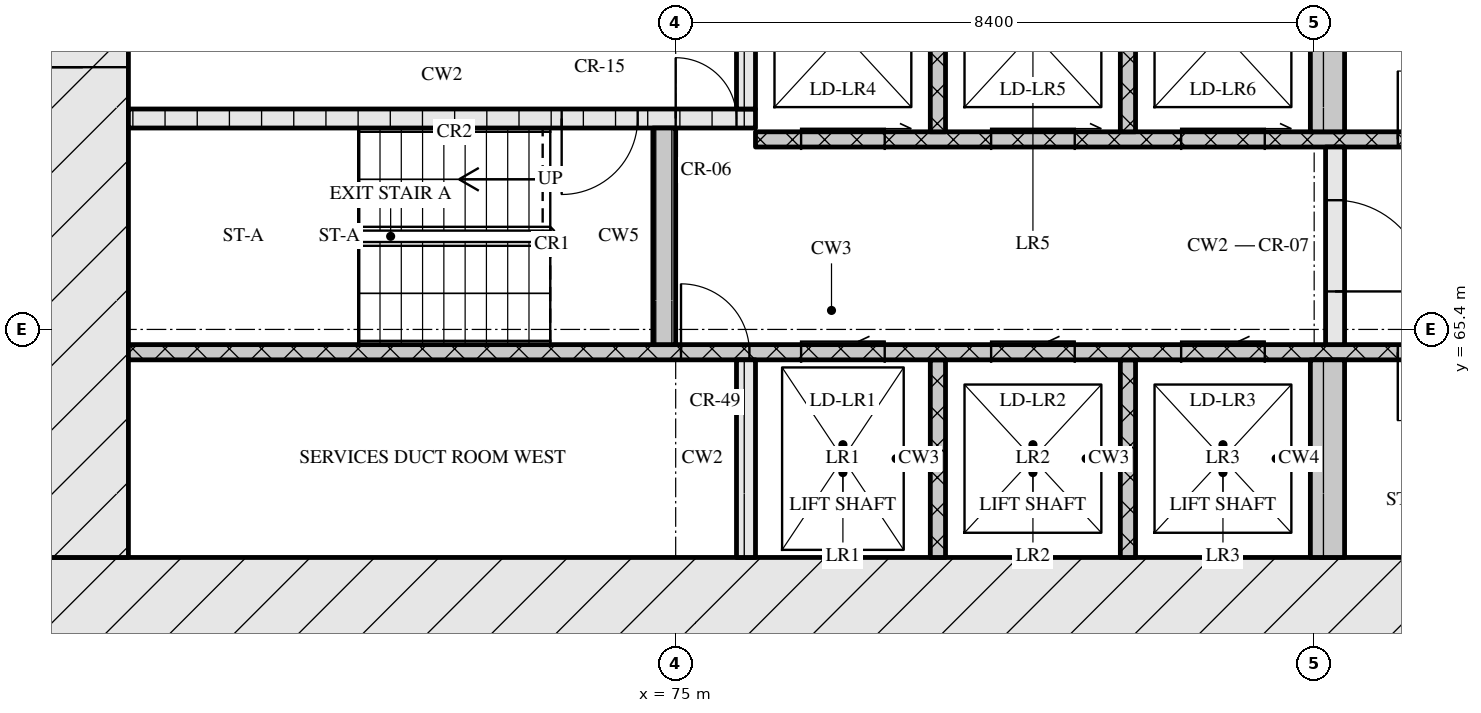
"""IFC4 building model, lengths in metres.
Left out: names, types, materials, properties, quantities, classifications, styles, units other than length and angle.
Written with IfcOpenShell. Run it as: python <this file> out.ifc"""

import sys

from ifc_helpers import new_model, si_unit, direction, frame, frame_2d, origin, place, context, subcontext, project, spatial, rectangle, extrude, element, fill, save


model = new_model("IFC4")
c1 = context("Model", 3, precision=1e-05, world=origin(), true_north=direction((0.0, 1.0)))
c2 = subcontext(c1, "Body", "Model", "MODEL_VIEW")
j1 = project(units=[si_unit("LENGTHUNIT", "METRE"), si_unit("PLANEANGLEUNIT", "RADIAN")], contexts=[c1])
p1 = place(None, origin())
s1 = spatial("IfcSite", under=j1, at=p1, CompositionType="ELEMENT")
p2 = place(p1, origin())
s2 = spatial("IfcBuilding", under=s1, at=p2, CompositionType="ELEMENT")
p3 = place(p2, frame((0.0, 0.0, 66.0)))
s3 = spatial("IfcBuildingStorey", under=s2, at=p3, CompositionType="ELEMENT", Elevation=66.0)
p4 = place(p3, frame((66.6, 61.8, 0.0), z_axis=(0.0, 0.0, 1.0), x_axis=(1.0, 0.0, 0.0)))
e1 = element("IfcWall", 1, at=p4, inside=s3, PredefinedType="SOLIDWALL", context=c2, shape_type="SweptSolid", body=[
    extrude(rectangle(XDim=42.0, YDim=1.2, at=frame_2d((21.0, 0.0))), origin(), (0.0, 0.0, 1.0), 3.32),
])
p5 = place(p4, frame((21.35, 0.0, 0.0)))
e2 = element("IfcOpeningElement", 2, at=p5, cuts=e1, PredefinedType="OPENING", context=c2, shape_type="SweptSolid", body=[
    extrude(rectangle(XDim=1.8, YDim=2.1, at=frame_2d((0.9, 1.05))), frame((0.0, 0.61, 0.0), z_axis=(0.0, -1.0, 0.0), x_axis=(1.0, 0.0, 0.0)), (0.0, 0.0, 1.0), 1.22),
])
p6 = place(p3, frame((67.2, 62.4, 0.0), z_axis=(0.0, 0.0, 1.0), x_axis=(0.0, 1.0, 0.0)))
e3 = element("IfcWall", 3, at=p6, inside=s3, PredefinedType="SOLIDWALL", context=c2, shape_type="SweptSolid", body=[
    extrude(rectangle(XDim=12.0, YDim=1.2, at=frame_2d((6.0, 0.0))), origin(), (0.0, 0.0, 1.0), 3.32),
])
p7 = place(p6, frame((6.45, 0.0, 0.0)))
e4 = element("IfcOpeningElement", 4, at=p7, cuts=e3, PredefinedType="OPENING", context=c2, shape_type="SweptSolid", body=[
    extrude(rectangle(XDim=1.2, YDim=2.1, at=frame_2d((0.6, 1.05))), frame((0.0, 0.61, 0.0), z_axis=(0.0, -1.0, 0.0), x_axis=(1.0, 0.0, 0.0)), (0.0, 0.0, 1.0), 1.22),
])
p8 = place(p3, frame((75.925, 62.4, 0.0), z_axis=(0.0, 0.0, 1.0), x_axis=(0.0, 1.0, 0.0)))
e5 = element("IfcWall", 5, at=p8, inside=s3, PredefinedType="SOLIDWALL", context=c2, shape_type="SweptSolid", body=[
    extrude(rectangle(XDim=2.6, YDim=0.25, at=frame_2d((1.3, 0.0))), origin(), (0.0, 0.0, 1.0), 3.32),
])
for number, where, z_axis, x_axis in (
    (6, (78.45, 62.4, 0.0), (0.0, 0.0, 1.0), (0.0, 1.0, 0.0)),
    (7, (80.95, 62.4, 0.0), (0.0, 0.0, 1.0), (0.0, 1.0, 0.0)),
):
    element("IfcWall", number, at=place(p3, frame(where, z_axis=z_axis, x_axis=x_axis)), inside=s3, PredefinedType="SOLIDWALL", context=c2, shape_type="SweptSolid", body=[
        extrude(rectangle(XDim=2.6, YDim=0.2, at=frame_2d((1.3, 0.0))), origin(), (0.0, 0.0, 1.0), 3.32),
    ])
p9 = place(p3, frame((83.575, 62.4, 0.0), z_axis=(0.0, 0.0, 1.0), x_axis=(0.0, 1.0, 0.0)))
e8 = element("IfcWall", 8, at=p9, inside=s3, PredefinedType="SOLIDWALL", context=c2, shape_type="SweptSolid", body=[
    extrude(rectangle(XDim=2.6, YDim=0.45, at=frame_2d((1.3, 0.0))), origin(), (0.0, 0.0, 1.0), 3.32),
])
p10 = place(p3, frame((67.8, 65.1, 0.0), z_axis=(0.0, 0.0, 1.0), x_axis=(1.0, 0.0, 0.0)))
e9 = element("IfcWall", 9, at=p10, inside=s3, PredefinedType="SOLIDWALL", context=c2, shape_type="SweptSolid", body=[
    extrude(rectangle(XDim=18.5, YDim=0.2, at=frame_2d((9.25, 0.0))), origin(), (0.0, 0.0, 1.0), 3.32),
])
p11 = place(p10, frame((7.27, 0.0, 0.0)))
e10 = element("IfcOpeningElement", 10, at=p11, cuts=e9, PredefinedType="OPENING", context=c2, shape_type="SweptSolid", body=[
    extrude(rectangle(XDim=0.9, YDim=2.1, at=frame_2d((0.45, 1.05))), frame((0.0, 0.11, 0.0), z_axis=(0.0, -1.0, 0.0), x_axis=(1.0, 0.0, 0.0)), (0.0, 0.0, 1.0), 0.22),
])
p12 = place(p10, frame((8.85, 0.0, 0.0)))
e11 = element("IfcOpeningElement", 11, at=p12, cuts=e9, PredefinedType="OPENING", context=c2, shape_type="SweptSolid", body=[
    extrude(rectangle(XDim=1.1, YDim=2.1, at=frame_2d((0.55, 1.05))), frame((0.0, 0.11, 0.0), z_axis=(0.0, -1.0, 0.0), x_axis=(1.0, 0.0, 0.0)), (0.0, 0.0, 1.0), 0.22),
])
p13 = place(p10, frame((11.35, 0.0, 0.0)))
e12 = element("IfcOpeningElement", 12, at=p13, cuts=e9, PredefinedType="OPENING", context=c2, shape_type="SweptSolid", body=[
    extrude(rectangle(XDim=1.1, YDim=2.1, at=frame_2d((0.55, 1.05))), frame((0.0, 0.11, 0.0), z_axis=(0.0, -1.0, 0.0), x_axis=(1.0, 0.0, 0.0)), (0.0, 0.0, 1.0), 0.22),
])
p14 = place(p10, frame((13.85, 0.0, 0.0)))
e13 = element("IfcOpeningElement", 13, at=p14, cuts=e9, PredefinedType="OPENING", context=c2, shape_type="SweptSolid", body=[
    extrude(rectangle(XDim=1.1, YDim=2.1, at=frame_2d((0.55, 1.05))), frame((0.0, 0.11, 0.0), z_axis=(0.0, -1.0, 0.0), x_axis=(1.0, 0.0, 0.0)), (0.0, 0.0, 1.0), 0.22),
])
p15 = place(p10, frame((16.7, 0.0, 0.0)))
e14 = element("IfcOpeningElement", 14, at=p15, cuts=e9, PredefinedType="OPENING", context=c2, shape_type="SweptSolid", body=[
    extrude(rectangle(XDim=0.9, YDim=2.1, at=frame_2d((0.45, 1.05))), frame((0.0, 0.11, 0.0), z_axis=(0.0, -1.0, 0.0), x_axis=(1.0, 0.0, 0.0)), (0.0, 0.0, 1.0), 0.22),
])
p16 = place(p3, frame((74.85, 65.2, 0.0), z_axis=(0.0, 0.0, 1.0), x_axis=(0.0, 1.0, 0.0)))
e15 = element("IfcWall", 15, at=p16, inside=s3, PredefinedType="SOLIDWALL", context=c2, shape_type="SweptSolid", body=[
    extrude(rectangle(XDim=2.85, YDim=0.3, at=frame_2d((1.425, 0.0))), origin(), (0.0, 0.0, 1.0), 3.32),
])
p17 = place(p3, frame((83.675, 65.2, 0.0), z_axis=(0.0, 0.0, 1.0), x_axis=(0.0, 1.0, 0.0)))
e16 = element("IfcWall", 16, at=p17, inside=s3, PredefinedType="SOLIDWALL", context=c2, shape_type="SweptSolid", body=[
    extrude(rectangle(XDim=2.6, YDim=0.25, at=frame_2d((1.3, 0.0))), origin(), (0.0, 0.0, 1.0), 3.32),
])
p18 = place(p17, frame((0.7, 0.0, 0.0)))
e17 = element("IfcOpeningElement", 17, at=p18, cuts=e16, PredefinedType="OPENING", context=c2, shape_type="SweptSolid", body=[
    extrude(rectangle(XDim=1.2, YDim=2.1, at=frame_2d((0.6, 1.05))), frame((0.0, 0.135, 0.0), z_axis=(0.0, -1.0, 0.0), x_axis=(1.0, 0.0, 0.0)), (0.0, 0.0, 1.0), 0.27),
])
p19 = place(p3, frame((76.05, 67.9, 0.0), z_axis=(0.0, 0.0, 1.0), x_axis=(1.0, 0.0, 0.0)))
e18 = element("IfcWall", 18, at=p19, inside=s3, PredefinedType="SOLIDWALL", context=c2, shape_type="SweptSolid", body=[
    extrude(rectangle(XDim=23.1, YDim=0.2, at=frame_2d((11.55, 0.0))), origin(), (0.0, 0.0, 1.0), 3.32),
])
p20 = place(p19, frame((0.6, 0.0, 0.0)))
e19 = element("IfcOpeningElement", 19, at=p20, cuts=e18, PredefinedType="OPENING", context=c2, shape_type="SweptSolid", body=[
    extrude(rectangle(XDim=1.1, YDim=2.1, at=frame_2d((0.55, 1.05))), frame((0.0, 0.11, 0.0), z_axis=(0.0, -1.0, 0.0), x_axis=(1.0, 0.0, 0.0)), (0.0, 0.0, 1.0), 0.22),
])
p21 = place(p19, frame((3.1, 0.0, 0.0)))
e20 = element("IfcOpeningElement", 20, at=p21, cuts=e18, PredefinedType="OPENING", context=c2, shape_type="SweptSolid", body=[
    extrude(rectangle(XDim=1.1, YDim=2.1, at=frame_2d((0.55, 1.05))), frame((0.0, 0.11, 0.0), z_axis=(0.0, -1.0, 0.0), x_axis=(1.0, 0.0, 0.0)), (0.0, 0.0, 1.0), 0.22),
])
p22 = place(p19, frame((5.6, 0.0, 0.0)))
e21 = element("IfcOpeningElement", 21, at=p22, cuts=e18, PredefinedType="OPENING", context=c2, shape_type="SweptSolid", body=[
    extrude(rectangle(XDim=1.1, YDim=2.1, at=frame_2d((0.55, 1.05))), frame((0.0, 0.11, 0.0), z_axis=(0.0, -1.0, 0.0), x_axis=(1.0, 0.0, 0.0)), (0.0, 0.0, 1.0), 0.22),
])
p23 = place(p19, frame((8.45, 0.0, 0.0)))
e22 = element("IfcOpeningElement", 22, at=p23, cuts=e18, PredefinedType="OPENING", context=c2, shape_type="SweptSolid", body=[
    extrude(rectangle(XDim=0.9, YDim=2.1, at=frame_2d((0.45, 1.05))), frame((0.0, 0.11, 0.0), z_axis=(0.0, -1.0, 0.0), x_axis=(1.0, 0.0, 0.0)), (0.0, 0.0, 1.0), 0.22),
])
p24 = place(p19, frame((10.91, 0.0, 0.0)))
e23 = element("IfcOpeningElement", 23, at=p24, cuts=e18, PredefinedType="OPENING", context=c2, shape_type="SweptSolid", body=[
    extrude(rectangle(XDim=0.9, YDim=2.1, at=frame_2d((0.45, 1.05))), frame((0.0, 0.11, 0.0), z_axis=(0.0, -1.0, 0.0), x_axis=(1.0, 0.0, 0.0)), (0.0, 0.0, 1.0), 0.22),
])
p25 = place(p19, frame((13.55, 0.0, 0.0)))
e24 = element("IfcOpeningElement", 24, at=p25, cuts=e18, PredefinedType="OPENING", context=c2, shape_type="SweptSolid", body=[
    extrude(rectangle(XDim=1.0, YDim=2.1, at=frame_2d((0.5, 1.05))), frame((0.0, 0.11, 0.0), z_axis=(0.0, -1.0, 0.0), x_axis=(1.0, 0.0, 0.0)), (0.0, 0.0, 1.0), 0.22),
])
for number, where, z_axis, x_axis in (
    (25, (78.45, 68.0, 0.0), (0.0, 0.0, 1.0), (0.0, 1.0, 0.0)),
    (26, (80.95, 68.0, 0.0), (0.0, 0.0, 1.0), (0.0, 1.0, 0.0)),
):
    element("IfcWall", number, at=place(p3, frame(where, z_axis=z_axis, x_axis=x_axis)), inside=s3, PredefinedType="SOLIDWALL", context=c2, shape_type="SweptSolid", body=[
        extrude(rectangle(XDim=2.6, YDim=0.2, at=frame_2d((1.3, 0.0))), origin(), (0.0, 0.0, 1.0), 3.32),
    ])
p26 = place(p3, frame((83.575, 68.0, 0.0), z_axis=(0.0, 0.0, 1.0), x_axis=(0.0, 1.0, 0.0)))
e27 = element("IfcWall", 27, at=p26, inside=s3, PredefinedType="SOLIDWALL", context=c2, shape_type="SweptSolid", body=[
    extrude(rectangle(XDim=2.6, YDim=0.45, at=frame_2d((1.3, 0.0))), origin(), (0.0, 0.0, 1.0), 3.32),
])
p27 = place(p3, frame((67.8, 68.175, 0.0), z_axis=(0.0, 0.0, 1.0), x_axis=(1.0, 0.0, 0.0)))
e28 = element("IfcWall", 28, at=p27, inside=s3, PredefinedType="SOLIDWALL", context=c2, shape_type="SweptSolid", body=[
    extrude(rectangle(XDim=8.25, YDim=0.25, at=frame_2d((4.125, 0.0))), origin(), (0.0, 0.0, 1.0), 3.32),
])
p28 = place(p27, frame((5.7, 0.0, 0.0)))
e29 = element("IfcOpeningElement", 29, at=p28, cuts=e28, PredefinedType="OPENING", context=c2, shape_type="SweptSolid", body=[
    extrude(rectangle(XDim=1.0, YDim=2.1, at=frame_2d((0.5, 1.05))), frame((0.0, 0.135, 0.0), z_axis=(0.0, -1.0, 0.0), x_axis=(1.0, 0.0, 0.0)), (0.0, 0.0, 1.0), 0.27),
])
p29 = place(p27, frame((7.2, 0.0, 0.0)))
e30 = element("IfcOpeningElement", 30, at=p29, cuts=e28, PredefinedType="OPENING", context=c2, shape_type="SweptSolid", body=[
    extrude(rectangle(XDim=0.8, YDim=2.1, at=frame_2d((0.4, 1.05))), frame((0.0, 0.135, 0.0), z_axis=(0.0, -1.0, 0.0), x_axis=(1.0, 0.0, 0.0)), (0.0, 0.0, 1.0), 0.27),
])
p30 = place(p3, frame((75.925, 68.3, 0.0), z_axis=(0.0, 0.0, 1.0), x_axis=(0.0, 1.0, 0.0)))
e31 = element("IfcWall", 31, at=p30, inside=s3, PredefinedType="SOLIDWALL", context=c2, shape_type="SweptSolid", body=[
    extrude(rectangle(XDim=2.3, YDim=0.25, at=frame_2d((1.15, 0.0))), origin(), (0.0, 0.0, 1.0), 3.32),
])
p31 = place(p11, origin())
e32 = element("IfcDoor", 32, at=p31, inside=s3, OperationType="SINGLE_SWING_LEFT", PredefinedType="DOOR", context=c2, shape_type="SweptSolid", body=[
    extrude(rectangle(XDim=0.9, YDim=2.1, at=frame_2d((0.45, 1.05))), frame((0.0, 0.025, 0.0), z_axis=(0.0, -1.0, 0.0), x_axis=(1.0, 0.0, 0.0)), (0.0, 0.0, 1.0), 0.05),
])
fill(e10, e32)
p32 = place(p12, origin())
e33 = element("IfcDoor", 33, at=p32, inside=s3, OperationType="SLIDING_TO_LEFT", PredefinedType="DOOR", context=c2, shape_type="SweptSolid", body=[
    extrude(rectangle(XDim=1.1, YDim=2.1, at=frame_2d((0.55, 1.05))), frame((0.0, 0.025, 0.0), z_axis=(0.0, -1.0, 0.0), x_axis=(1.0, 0.0, 0.0)), (0.0, 0.0, 1.0), 0.05),
])
fill(e11, e33)
p33 = place(p13, origin())
e34 = element("IfcDoor", 34, at=p33, inside=s3, OperationType="SLIDING_TO_LEFT", PredefinedType="DOOR", context=c2, shape_type="SweptSolid", body=[
    extrude(rectangle(XDim=1.1, YDim=2.1, at=frame_2d((0.55, 1.05))), frame((0.0, 0.025, 0.0), z_axis=(0.0, -1.0, 0.0), x_axis=(1.0, 0.0, 0.0)), (0.0, 0.0, 1.0), 0.05),
])
fill(e12, e34)
p34 = place(p14, origin())
e35 = element("IfcDoor", 35, at=p34, inside=s3, OperationType="SLIDING_TO_LEFT", PredefinedType="DOOR", context=c2, shape_type="SweptSolid", body=[
    extrude(rectangle(XDim=1.1, YDim=2.1, at=frame_2d((0.55, 1.05))), frame((0.0, 0.025, 0.0), z_axis=(0.0, -1.0, 0.0), x_axis=(1.0, 0.0, 0.0)), (0.0, 0.0, 1.0), 0.05),
])
fill(e13, e35)
p35 = place(p15, origin())
e36 = element("IfcDoor", 36, at=p35, inside=s3, OperationType="SINGLE_SWING_RIGHT", PredefinedType="DOOR", context=c2, shape_type="SweptSolid", body=[
    extrude(rectangle(XDim=0.9, YDim=2.1, at=frame_2d((0.45, 1.05))), frame((0.0, 0.025, 0.0), z_axis=(0.0, -1.0, 0.0), x_axis=(1.0, 0.0, 0.0)), (0.0, 0.0, 1.0), 0.05),
])
fill(e14, e36)
p36 = place(p18, origin())
e37 = element("IfcDoor", 37, at=p36, inside=s3, OperationType="SINGLE_SWING_RIGHT", PredefinedType="DOOR", context=c2, shape_type="SweptSolid", body=[
    extrude(rectangle(XDim=1.2, YDim=2.1, at=frame_2d((0.6, 1.05))), frame((0.0, 0.025, 0.0), z_axis=(0.0, -1.0, 0.0), x_axis=(1.0, 0.0, 0.0)), (0.0, 0.0, 1.0), 0.05),
])
fill(e17, e37)
p37 = place(p20, origin())
e38 = element("IfcDoor", 38, at=p37, inside=s3, OperationType="SLIDING_TO_RIGHT", PredefinedType="DOOR", context=c2, shape_type="SweptSolid", body=[
    extrude(rectangle(XDim=1.1, YDim=2.1, at=frame_2d((0.55, 1.05))), frame((0.0, 0.025, 0.0), z_axis=(0.0, -1.0, 0.0), x_axis=(1.0, 0.0, 0.0)), (0.0, 0.0, 1.0), 0.05),
])
fill(e19, e38)
p38 = place(p21, origin())
e39 = element("IfcDoor", 39, at=p38, inside=s3, OperationType="SLIDING_TO_RIGHT", PredefinedType="DOOR", context=c2, shape_type="SweptSolid", body=[
    extrude(rectangle(XDim=1.1, YDim=2.1, at=frame_2d((0.55, 1.05))), frame((0.0, 0.025, 0.0), z_axis=(0.0, -1.0, 0.0), x_axis=(1.0, 0.0, 0.0)), (0.0, 0.0, 1.0), 0.05),
])
fill(e20, e39)
p39 = place(p22, origin())
e40 = element("IfcDoor", 40, at=p39, inside=s3, OperationType="SLIDING_TO_RIGHT", PredefinedType="DOOR", context=c2, shape_type="SweptSolid", body=[
    extrude(rectangle(XDim=1.1, YDim=2.1, at=frame_2d((0.55, 1.05))), frame((0.0, 0.025, 0.0), z_axis=(0.0, -1.0, 0.0), x_axis=(1.0, 0.0, 0.0)), (0.0, 0.0, 1.0), 0.05),
])
fill(e21, e40)
p40 = place(p23, origin())
e41 = element("IfcDoor", 41, at=p40, inside=s3, OperationType="SINGLE_SWING_LEFT", PredefinedType="DOOR", context=c2, shape_type="SweptSolid", body=[
    extrude(rectangle(XDim=0.9, YDim=2.1, at=frame_2d((0.45, 1.05))), frame((0.0, 0.025, 0.0), z_axis=(0.0, -1.0, 0.0), x_axis=(1.0, 0.0, 0.0)), (0.0, 0.0, 1.0), 0.05),
])
fill(e22, e41)
p41 = place(p28, origin())
e42 = element("IfcDoor", 42, at=p41, inside=s3, OperationType="SINGLE_SWING_RIGHT", PredefinedType="DOOR", context=c2, shape_type="SweptSolid", body=[
    extrude(rectangle(XDim=1.0, YDim=2.1, at=frame_2d((0.5, 1.05))), frame((0.0, 0.025, 0.0), z_axis=(0.0, -1.0, 0.0), x_axis=(1.0, 0.0, 0.0)), (0.0, 0.0, 1.0), 0.05),
])
fill(e29, e42)
p42 = place(p29, origin())
e43 = element("IfcDoor", 43, at=p42, inside=s3, OperationType="SINGLE_SWING_LEFT", PredefinedType="DOOR", context=c2, shape_type="SweptSolid", body=[
    extrude(rectangle(XDim=0.8, YDim=2.1, at=frame_2d((0.4, 1.05))), frame((0.0, 0.025, 0.0), z_axis=(0.0, -1.0, 0.0), x_axis=(1.0, 0.0, 0.0)), (0.0, 0.0, 1.0), 0.05),
])
fill(e30, e43)
p43 = place(p7, origin())
e44 = element("IfcDoor", 44, at=p43, inside=s3, OperationType="SINGLE_SWING_LEFT", PredefinedType="DOOR", context=c2, shape_type="SweptSolid", body=[
    extrude(rectangle(XDim=1.2, YDim=2.1, at=frame_2d((0.6, 1.05))), frame((0.0, 0.025, 0.0), z_axis=(0.0, -1.0, 0.0), x_axis=(1.0, 0.0, 0.0)), (0.0, 0.0, 1.0), 0.05),
])
fill(e4, e44)
save(model, sys.argv[1])
